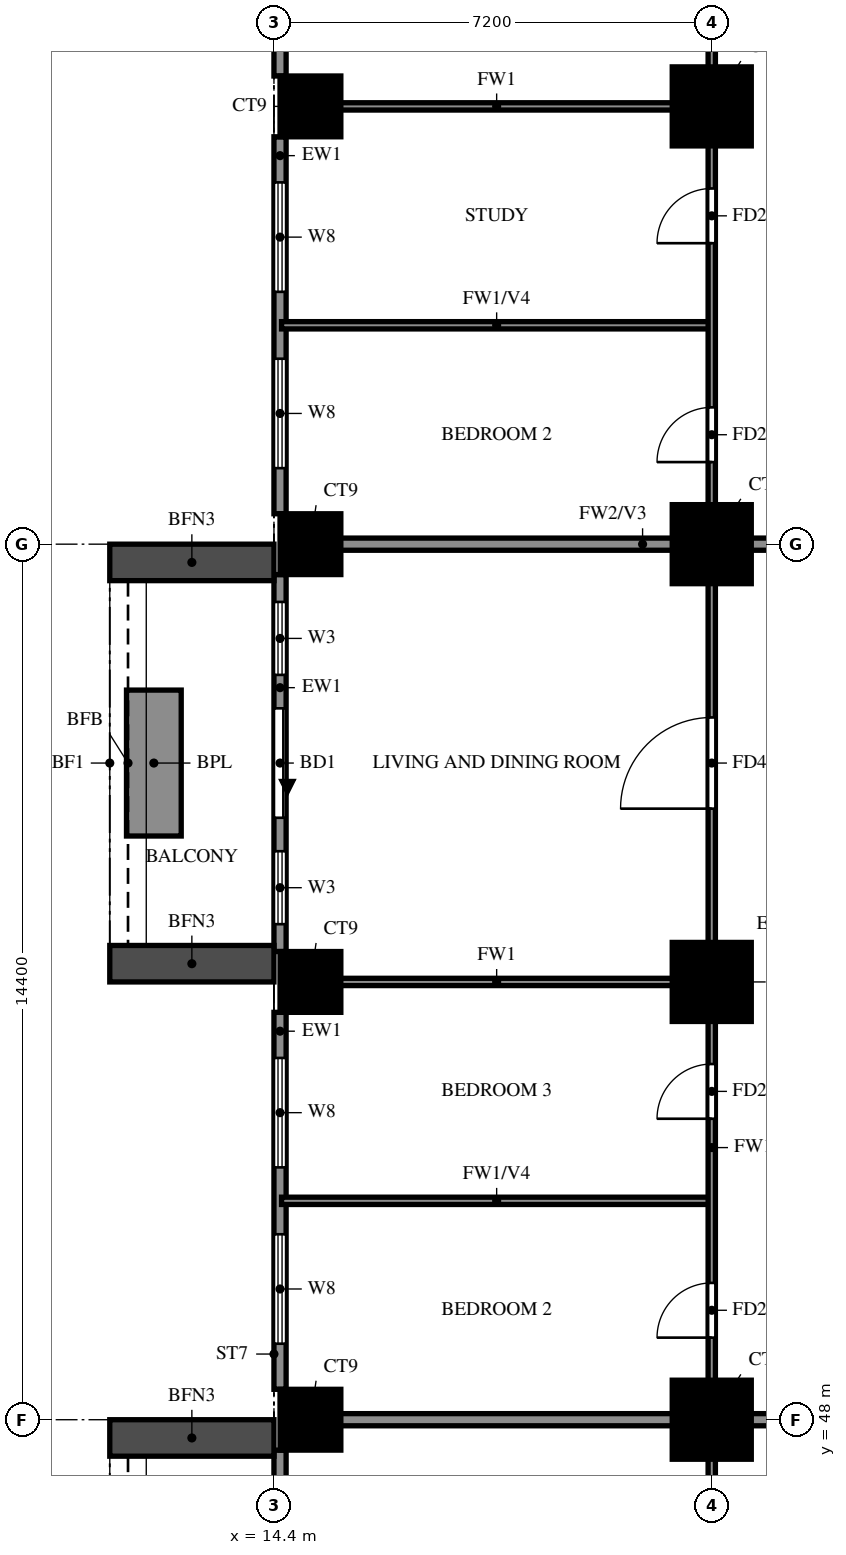
"""IFC4 building model, lengths in metres.
Left out: names, types, materials, properties, quantities, classifications, styles, units other than length and angle.
Written with IfcOpenShell. Run it as: python <this file> out.ifc"""

import sys

from ifc_helpers import new_model, si_unit, direction, frame, frame_2d, origin, origin_2d, place, context, subcontext, project, spatial, rectangle, extrude, source, transform, mapped, element, fill, save


model = new_model("IFC4")
c1 = context("Model", 3, precision=1e-05, world=origin(), true_north=direction((0.0, 1.0)))
c2 = subcontext(c1, "Body", "Model", "MODEL_VIEW")
j1 = project(units=[si_unit("LENGTHUNIT", "METRE"), si_unit("PLANEANGLEUNIT", "RADIAN")], contexts=[c1])
p1 = place(None, origin())
s1 = spatial("IfcSite", under=j1, at=p1, CompositionType="ELEMENT")
p2 = place(p1, origin())
s2 = spatial("IfcBuilding", under=s1, at=p2, CompositionType="ELEMENT")
p3 = place(p2, frame((0.0, 0.0, 69.0)))
s3 = spatial("IfcBuildingStorey", under=s2, at=p3, CompositionType="ELEMENT", Elevation=69.0)
m1 = source(origin(), c2, "Body", "SweptSolid", [
    extrude(rectangle(XDim=1.0, YDim=1.0, at=origin_2d()), origin(), (0.0, 0.0, 1.0), 3.18),
])
p4 = place(p3, frame((15.0, 48.0, 0.0), z_axis=(0.0, 0.0, 1.0), x_axis=(1.0, 0.0, 0.0)))
e1 = element("IfcColumn", 1, at=p4, inside=s3, PredefinedType="COLUMN", context=c2, shape_type="MappedRepresentation", body=[
    mapped(m1, transform((0.0, 0.0, 0.0))),
])
m2 = source(origin(), c2, "Body", "SweptSolid", [
    extrude(rectangle(XDim=1.3, YDim=1.3, at=origin_2d()), origin(), (0.0, 0.0, 1.0), 3.18),
])
p5 = place(p3, frame((21.6, 48.0, 0.0), z_axis=(0.0, 0.0, 1.0), x_axis=(1.0, 0.0, 0.0)))
e2 = element("IfcColumn", 2, at=p5, inside=s3, PredefinedType="COLUMN", context=c2, shape_type="MappedRepresentation", body=[
    mapped(m2, transform((0.0, 0.0, 0.0))),
])
p6 = place(p3, frame((15.0, 55.2, 0.0), z_axis=(0.0, 0.0, 1.0), x_axis=(1.0, 0.0, 0.0)))
e3 = element("IfcColumn", 3, at=p6, inside=s3, PredefinedType="COLUMN", context=c2, shape_type="MappedRepresentation", body=[
    mapped(m1, transform((0.0, 0.0, 0.0))),
])
p7 = place(p3, frame((21.6, 55.2, 0.0), z_axis=(0.0, 0.0, 1.0), x_axis=(1.0, 0.0, 0.0)))
e4 = element("IfcColumn", 4, at=p7, inside=s3, PredefinedType="COLUMN", context=c2, shape_type="MappedRepresentation", body=[
    mapped(m2, transform((0.0, 0.0, 0.0))),
])
p8 = place(p3, frame((15.0, 62.4, 0.0), z_axis=(0.0, 0.0, 1.0), x_axis=(1.0, 0.0, 0.0)))
e5 = element("IfcColumn", 5, at=p8, inside=s3, PredefinedType="COLUMN", context=c2, shape_type="MappedRepresentation", body=[
    mapped(m1, transform((0.0, 0.0, 0.0))),
])
p9 = place(p3, frame((21.6, 62.4, 0.0), z_axis=(0.0, 0.0, 1.0), x_axis=(1.0, 0.0, 0.0)))
e6 = element("IfcColumn", 6, at=p9, inside=s3, PredefinedType="COLUMN", context=c2, shape_type="MappedRepresentation", body=[
    mapped(m2, transform((0.0, 0.0, 0.0))),
])
p10 = place(p3, frame((15.0, 69.6, 0.0), z_axis=(0.0, 0.0, 1.0), x_axis=(1.0, 0.0, 0.0)))
e7 = element("IfcColumn", 7, at=p10, inside=s3, PredefinedType="COLUMN", context=c2, shape_type="MappedRepresentation", body=[
    mapped(m1, transform((0.0, 0.0, 0.0))),
])
p11 = place(p3, frame((21.6, 69.6, 0.0), z_axis=(0.0, 0.0, 1.0), x_axis=(1.0, 0.0, 0.0)))
e8 = element("IfcColumn", 8, at=p11, inside=s3, PredefinedType="COLUMN", context=c2, shape_type="MappedRepresentation", body=[
    mapped(m2, transform((0.0, 0.0, 0.0))),
])
p12 = place(p3, frame((14.5, 76.3, 0.0), z_axis=(0.0, 0.0, 1.0), x_axis=(0.0, -1.0, 0.0)))
e9 = element("IfcWall", 9, at=p12, inside=s3, PredefinedType="SOLIDWALL", context=c2, shape_type="SweptSolid", body=[
    extrude(rectangle(XDim=6.2, YDim=0.2, at=frame_2d((3.1, 0.0))), origin(), (0.0, 0.0, 1.0), 3.18),
])
p13 = place(p12, frame((3.65, 0.0, 0.6)))
e10 = element("IfcOpeningElement", 10, at=p13, cuts=e9, PredefinedType="OPENING", context=c2, shape_type="SweptSolid", body=[
    extrude(rectangle(XDim=1.8, YDim=2.4, at=frame_2d((0.9, 1.2))), frame((0.0, 0.11, 0.0), z_axis=(0.0, -1.0, 0.0), x_axis=(1.0, 0.0, 0.0)), (0.0, 0.0, 1.0), 0.22),
])
p14 = place(p12, frame((0.75, 0.0, 0.6)))
e11 = element("IfcOpeningElement", 11, at=p14, cuts=e9, PredefinedType="OPENING", context=c2, shape_type="SweptSolid", body=[
    extrude(rectangle(XDim=1.8, YDim=2.4, at=frame_2d((0.9, 1.2))), frame((0.0, 0.11, 0.0), z_axis=(0.0, -1.0, 0.0), x_axis=(1.0, 0.0, 0.0)), (0.0, 0.0, 1.0), 0.22),
])
p15 = place(p3, frame((14.5, 69.1, 0.0), z_axis=(0.0, 0.0, 1.0), x_axis=(0.0, -1.0, 0.0)))
e12 = element("IfcWall", 12, at=p15, inside=s3, PredefinedType="SOLIDWALL", context=c2, shape_type="SweptSolid", body=[
    extrude(rectangle(XDim=6.2, YDim=0.2, at=frame_2d((3.1, 0.0))), origin(), (0.0, 0.0, 1.0), 3.18),
])
p16 = place(p15, frame((3.65, 0.0, 0.6)))
e13 = element("IfcOpeningElement", 13, at=p16, cuts=e12, PredefinedType="OPENING", context=c2, shape_type="SweptSolid", body=[
    extrude(rectangle(XDim=1.8, YDim=2.4, at=frame_2d((0.9, 1.2))), frame((0.0, 0.11, 0.0), z_axis=(0.0, -1.0, 0.0), x_axis=(1.0, 0.0, 0.0)), (0.0, 0.0, 1.0), 0.22),
])
p17 = place(p15, frame((0.75, 0.0, 0.6)))
e14 = element("IfcOpeningElement", 14, at=p17, cuts=e12, PredefinedType="OPENING", context=c2, shape_type="SweptSolid", body=[
    extrude(rectangle(XDim=1.8, YDim=2.4, at=frame_2d((0.9, 1.2))), frame((0.0, 0.11, 0.0), z_axis=(0.0, -1.0, 0.0), x_axis=(1.0, 0.0, 0.0)), (0.0, 0.0, 1.0), 0.22),
])
p18 = place(p3, frame((14.5, 61.9, 0.0), z_axis=(0.0, 0.0, 1.0), x_axis=(0.0, -1.0, 0.0)))
e15 = element("IfcWall", 15, at=p18, inside=s3, PredefinedType="SOLIDWALL", context=c2, shape_type="SweptSolid", body=[
    extrude(rectangle(XDim=6.2, YDim=0.2, at=frame_2d((3.1, 0.0))), origin(), (0.0, 0.0, 1.0), 3.18),
])
p19 = place(p18, frame((2.2, 0.0, 0.0)))
e16 = element("IfcOpeningElement", 16, at=p19, cuts=e15, PredefinedType="OPENING", context=c2, shape_type="SweptSolid", body=[
    extrude(rectangle(XDim=1.8, YDim=2.4, at=frame_2d((0.9, 1.2))), frame((0.0, 0.11, 0.0), z_axis=(0.0, -1.0, 0.0), x_axis=(1.0, 0.0, 0.0)), (0.0, 0.0, 1.0), 0.22),
])
p20 = place(p18, frame((0.45, 0.0, 0.6)))
e17 = element("IfcOpeningElement", 17, at=p20, cuts=e15, PredefinedType="OPENING", context=c2, shape_type="SweptSolid", body=[
    extrude(rectangle(XDim=1.2, YDim=2.4, at=frame_2d((0.6, 1.2))), frame((0.0, 0.11, 0.0), z_axis=(0.0, -1.0, 0.0), x_axis=(1.0, 0.0, 0.0)), (0.0, 0.0, 1.0), 0.22),
])
p21 = place(p18, frame((4.55, 0.0, 0.6)))
e18 = element("IfcOpeningElement", 18, at=p21, cuts=e15, PredefinedType="OPENING", context=c2, shape_type="SweptSolid", body=[
    extrude(rectangle(XDim=1.2, YDim=2.4, at=frame_2d((0.6, 1.2))), frame((0.0, 0.11, 0.0), z_axis=(0.0, -1.0, 0.0), x_axis=(1.0, 0.0, 0.0)), (0.0, 0.0, 1.0), 0.22),
])
p22 = place(p3, frame((14.5, 54.7, 0.0), z_axis=(0.0, 0.0, 1.0), x_axis=(0.0, -1.0, 0.0)))
e19 = element("IfcWall", 19, at=p22, inside=s3, PredefinedType="SOLIDWALL", context=c2, shape_type="SweptSolid", body=[
    extrude(rectangle(XDim=6.2, YDim=0.2, at=frame_2d((3.1, 0.0))), origin(), (0.0, 0.0, 1.0), 3.18),
])
p23 = place(p22, frame((3.65, 0.0, 0.6)))
e20 = element("IfcOpeningElement", 20, at=p23, cuts=e19, PredefinedType="OPENING", context=c2, shape_type="SweptSolid", body=[
    extrude(rectangle(XDim=1.8, YDim=2.4, at=frame_2d((0.9, 1.2))), frame((0.0, 0.11, 0.0), z_axis=(0.0, -1.0, 0.0), x_axis=(1.0, 0.0, 0.0)), (0.0, 0.0, 1.0), 0.22),
])
p24 = place(p22, frame((0.75, 0.0, 0.6)))
e21 = element("IfcOpeningElement", 21, at=p24, cuts=e19, PredefinedType="OPENING", context=c2, shape_type="SweptSolid", body=[
    extrude(rectangle(XDim=1.8, YDim=2.4, at=frame_2d((0.9, 1.2))), frame((0.0, 0.11, 0.0), z_axis=(0.0, -1.0, 0.0), x_axis=(1.0, 0.0, 0.0)), (0.0, 0.0, 1.0), 0.22),
])
p25 = place(p3, frame((14.5, 47.5, 0.0), z_axis=(0.0, 0.0, 1.0), x_axis=(0.0, -1.0, 0.0)))
e22 = element("IfcWall", 22, at=p25, inside=s3, PredefinedType="SOLIDWALL", context=c2, shape_type="SweptSolid", body=[
    extrude(rectangle(XDim=6.2, YDim=0.2, at=frame_2d((3.1, 0.0))), origin(), (0.0, 0.0, 1.0), 3.18),
])
p26 = place(p25, frame((2.2, 0.0, 0.0)))
e23 = element("IfcOpeningElement", 23, at=p26, cuts=e22, PredefinedType="OPENING", context=c2, shape_type="SweptSolid", body=[
    extrude(rectangle(XDim=1.8, YDim=2.4, at=frame_2d((0.9, 1.2))), frame((0.0, 0.11, 0.0), z_axis=(0.0, -1.0, 0.0), x_axis=(1.0, 0.0, 0.0)), (0.0, 0.0, 1.0), 0.22),
])
p27 = place(p25, frame((0.45, 0.0, 0.6)))
e24 = element("IfcOpeningElement", 24, at=p27, cuts=e22, PredefinedType="OPENING", context=c2, shape_type="SweptSolid", body=[
    extrude(rectangle(XDim=1.2, YDim=2.4, at=frame_2d((0.6, 1.2))), frame((0.0, 0.11, 0.0), z_axis=(0.0, -1.0, 0.0), x_axis=(1.0, 0.0, 0.0)), (0.0, 0.0, 1.0), 0.22),
])
p28 = place(p25, frame((4.55, 0.0, 0.6)))
e25 = element("IfcOpeningElement", 25, at=p28, cuts=e22, PredefinedType="OPENING", context=c2, shape_type="SweptSolid", body=[
    extrude(rectangle(XDim=1.2, YDim=2.4, at=frame_2d((0.6, 1.2))), frame((0.0, 0.11, 0.0), z_axis=(0.0, -1.0, 0.0), x_axis=(1.0, 0.0, 0.0)), (0.0, 0.0, 1.0), 0.22),
])
for number, where, z_axis, x_axis in (
    (26, (14.4, 62.1, 0.0), (0.0, 0.0, 1.0), (-1.0, 0.0, 0.0)),
    (27, (14.4, 55.5, 0.0), (0.0, 0.0, 1.0), (-1.0, 0.0, 0.0)),
):
    element("IfcWall", number, at=place(p3, frame(where, z_axis=z_axis, x_axis=x_axis)), inside=s3, PredefinedType="SOLIDWALL", context=c2, shape_type="SweptSolid", body=[
        extrude(rectangle(XDim=2.7, YDim=0.6, at=frame_2d((1.35, 0.0))), origin(), (0.0, 0.0, 1.0), 2.85),
    ])
p29 = place(p3, frame((12.425, 60.0, 0.0), z_axis=(0.0, 0.0, 1.0), x_axis=(0.0, -1.0, 0.0)))
e28 = element("IfcWall", 28, at=p29, inside=s3, PredefinedType="SOLIDWALL", context=c2, shape_type="SweptSolid", body=[
    extrude(rectangle(XDim=2.4, YDim=0.9, at=frame_2d((1.2, 0.0))), origin(), (0.0, 0.0, 1.0), 0.9),
])
p30 = place(p3, frame((14.4, 47.7, 0.0), z_axis=(0.0, 0.0, 1.0), x_axis=(-1.0, 0.0, 0.0)))
e29 = element("IfcWall", 29, at=p30, inside=s3, PredefinedType="SOLIDWALL", context=c2, shape_type="SweptSolid", body=[
    extrude(rectangle(XDim=2.7, YDim=0.6, at=frame_2d((1.35, 0.0))), origin(), (0.0, 0.0, 1.0), 2.85),
])
p31 = place(p3, frame((14.525, 48.0, 0.0), z_axis=(0.0, 0.0, 1.0), x_axis=(1.0, 0.0, 0.0)))
e30 = element("IfcWall", 30, at=p31, inside=s3, PredefinedType="SOLIDWALL", context=c2, shape_type="SweptSolid", body=[
    extrude(rectangle(XDim=19.075, YDim=0.2, at=frame_2d((9.538, 0.0))), origin(), (0.0, 0.0, 1.0), 3.18),
])
p32 = place(p3, frame((14.525, 62.4, 0.0), z_axis=(0.0, 0.0, 1.0), x_axis=(1.0, 0.0, 0.0)))
e31 = element("IfcWall", 31, at=p32, inside=s3, PredefinedType="SOLIDWALL", context=c2, shape_type="SweptSolid", body=[
    extrude(rectangle(XDim=11.875, YDim=0.2, at=frame_2d((5.938, 0.0))), origin(), (0.0, 0.0, 1.0), 3.18),
])
p33 = place(p3, frame((14.525, 51.6, 0.0), z_axis=(0.0, 0.0, 1.0), x_axis=(1.0, 0.0, 0.0)))
e32 = element("IfcWall", 32, at=p33, inside=s3, PredefinedType="PARTITIONING", context=c2, shape_type="SweptSolid", body=[
    extrude(rectangle(XDim=7.075, YDim=0.12, at=frame_2d((3.538, 0.0))), origin(), (0.0, 0.0, 1.0), 2.28),
])
p34 = place(p3, frame((14.525, 55.2, 0.0), z_axis=(0.0, 0.0, 1.0), x_axis=(1.0, 0.0, 0.0)))
e33 = element("IfcWall", 33, at=p34, inside=s3, PredefinedType="PARTITIONING", context=c2, shape_type="SweptSolid", body=[
    extrude(rectangle(XDim=7.075, YDim=0.12, at=frame_2d((3.538, 0.0))), origin(), (0.0, 0.0, 1.0), 3.18),
])
p35 = place(p3, frame((14.525, 66.0, 0.0), z_axis=(0.0, 0.0, 1.0), x_axis=(1.0, 0.0, 0.0)))
e34 = element("IfcWall", 34, at=p35, inside=s3, PredefinedType="PARTITIONING", context=c2, shape_type="SweptSolid", body=[
    extrude(rectangle(XDim=7.075, YDim=0.12, at=frame_2d((3.538, 0.0))), origin(), (0.0, 0.0, 1.0), 2.28),
])
p36 = place(p3, frame((14.525, 69.6, 0.0), z_axis=(0.0, 0.0, 1.0), x_axis=(1.0, 0.0, 0.0)))
e35 = element("IfcWall", 35, at=p36, inside=s3, PredefinedType="PARTITIONING", context=c2, shape_type="SweptSolid", body=[
    extrude(rectangle(XDim=7.075, YDim=0.12, at=frame_2d((3.538, 0.0))), origin(), (0.0, 0.0, 1.0), 3.18),
])
p37 = place(p3, frame((21.6, 33.725, 0.0), z_axis=(0.0, 0.0, 1.0), x_axis=(0.0, 1.0, 0.0)))
e36 = element("IfcWall", 36, at=p37, inside=s3, PredefinedType="PARTITIONING", context=c2, shape_type="SweptSolid", body=[
    extrude(rectangle(XDim=39.475, YDim=0.12, at=frame_2d((19.737, 0.0))), origin(), (0.0, 0.0, 1.0), 3.18),
])
p38 = place(p37, frame((7.775, 0.0, 0.0)))
e37 = element("IfcOpeningElement", 37, at=p38, cuts=e36, PredefinedType="OPENING", context=c2, shape_type="SweptSolid", body=[
    extrude(rectangle(XDim=0.9, YDim=2.1, at=frame_2d((0.45, 1.05))), frame((0.0, 0.07, 0.0), z_axis=(0.0, -1.0, 0.0), x_axis=(1.0, 0.0, 0.0)), (0.0, 0.0, 1.0), 0.14),
])
p39 = place(p37, frame((15.625, 0.0, 0.0)))
e38 = element("IfcOpeningElement", 38, at=p39, cuts=e36, PredefinedType="OPENING", context=c2, shape_type="SweptSolid", body=[
    extrude(rectangle(XDim=0.9, YDim=2.1, at=frame_2d((0.45, 1.05))), frame((0.0, 0.07, 0.0), z_axis=(0.0, -1.0, 0.0), x_axis=(1.0, 0.0, 0.0)), (0.0, 0.0, 1.0), 0.14),
])
p40 = place(p37, frame((19.225, 0.0, 0.0)))
e39 = element("IfcOpeningElement", 39, at=p40, cuts=e36, PredefinedType="OPENING", context=c2, shape_type="SweptSolid", body=[
    extrude(rectangle(XDim=0.9, YDim=2.1, at=frame_2d((0.45, 1.05))), frame((0.0, 0.07, 0.0), z_axis=(0.0, -1.0, 0.0), x_axis=(1.0, 0.0, 0.0)), (0.0, 0.0, 1.0), 0.14),
])
p41 = place(p37, frame((24.325, 0.0, 0.0)))
e40 = element("IfcOpeningElement", 40, at=p41, cuts=e36, PredefinedType="OPENING", context=c2, shape_type="SweptSolid", body=[
    extrude(rectangle(XDim=1.5, YDim=2.1, at=frame_2d((0.75, 1.05))), frame((0.0, 0.07, 0.0), z_axis=(0.0, -1.0, 0.0), x_axis=(1.0, 0.0, 0.0)), (0.0, 0.0, 1.0), 0.14),
])
p42 = place(p37, frame((30.025, 0.0, 0.0)))
e41 = element("IfcOpeningElement", 41, at=p42, cuts=e36, PredefinedType="OPENING", context=c2, shape_type="SweptSolid", body=[
    extrude(rectangle(XDim=0.9, YDim=2.1, at=frame_2d((0.45, 1.05))), frame((0.0, 0.07, 0.0), z_axis=(0.0, -1.0, 0.0), x_axis=(1.0, 0.0, 0.0)), (0.0, 0.0, 1.0), 0.14),
])
p43 = place(p37, frame((33.625, 0.0, 0.0)))
e42 = element("IfcOpeningElement", 42, at=p43, cuts=e36, PredefinedType="OPENING", context=c2, shape_type="SweptSolid", body=[
    extrude(rectangle(XDim=0.9, YDim=2.1, at=frame_2d((0.45, 1.05))), frame((0.0, 0.07, 0.0), z_axis=(0.0, -1.0, 0.0), x_axis=(1.0, 0.0, 0.0)), (0.0, 0.0, 1.0), 0.14),
])
p44 = place(p37, frame((37.225, 0.0, 0.0)))
e43 = element("IfcOpeningElement", 43, at=p44, cuts=e36, PredefinedType="OPENING", context=c2, shape_type="SweptSolid", body=[
    extrude(rectangle(XDim=0.9, YDim=2.1, at=frame_2d((0.45, 1.05))), frame((0.0, 0.07, 0.0), z_axis=(0.0, -1.0, 0.0), x_axis=(1.0, 0.0, 0.0)), (0.0, 0.0, 1.0), 0.14),
])
p45 = place(p16, origin())
e44 = element("IfcWindow", 44, at=p45, inside=s3, PartitioningType="DOUBLE_PANEL_VERTICAL", PredefinedType="WINDOW", context=c2, shape_type="SweptSolid", body=[
    extrude(rectangle(XDim=1.8, YDim=2.4, at=frame_2d((0.9, 1.2))), frame((0.0, 0.03, 0.0), z_axis=(0.0, -1.0, 0.0), x_axis=(1.0, 0.0, 0.0)), (0.0, 0.0, 1.0), 0.06),
])
fill(e13, e44)
p46 = place(p17, origin())
e45 = element("IfcWindow", 45, at=p46, inside=s3, PartitioningType="DOUBLE_PANEL_VERTICAL", PredefinedType="WINDOW", context=c2, shape_type="SweptSolid", body=[
    extrude(rectangle(XDim=1.8, YDim=2.4, at=frame_2d((0.9, 1.2))), frame((0.0, 0.03, 0.0), z_axis=(0.0, -1.0, 0.0), x_axis=(1.0, 0.0, 0.0)), (0.0, 0.0, 1.0), 0.06),
])
fill(e14, e45)
p47 = place(p19, origin())
e46 = element("IfcDoor", 46, at=p47, inside=s3, OperationType="DOUBLE_DOOR_SLIDING", PredefinedType="DOOR", context=c2, shape_type="SweptSolid", body=[
    extrude(rectangle(XDim=1.8, YDim=2.4, at=frame_2d((0.9, 1.2))), frame((0.0, 0.025, 0.0), z_axis=(0.0, -1.0, 0.0), x_axis=(1.0, 0.0, 0.0)), (0.0, 0.0, 1.0), 0.05),
])
fill(e16, e46)
p48 = place(p20, origin())
e47 = element("IfcWindow", 47, at=p48, inside=s3, PartitioningType="SINGLE_PANEL", PredefinedType="WINDOW", context=c2, shape_type="SweptSolid", body=[
    extrude(rectangle(XDim=1.2, YDim=2.4, at=frame_2d((0.6, 1.2))), frame((0.0, 0.03, 0.0), z_axis=(0.0, -1.0, 0.0), x_axis=(1.0, 0.0, 0.0)), (0.0, 0.0, 1.0), 0.06),
])
fill(e17, e47)
p49 = place(p21, origin())
e48 = element("IfcWindow", 48, at=p49, inside=s3, PartitioningType="SINGLE_PANEL", PredefinedType="WINDOW", context=c2, shape_type="SweptSolid", body=[
    extrude(rectangle(XDim=1.2, YDim=2.4, at=frame_2d((0.6, 1.2))), frame((0.0, 0.03, 0.0), z_axis=(0.0, -1.0, 0.0), x_axis=(1.0, 0.0, 0.0)), (0.0, 0.0, 1.0), 0.06),
])
fill(e18, e48)
p50 = place(p23, origin())
e49 = element("IfcWindow", 49, at=p50, inside=s3, PartitioningType="DOUBLE_PANEL_VERTICAL", PredefinedType="WINDOW", context=c2, shape_type="SweptSolid", body=[
    extrude(rectangle(XDim=1.8, YDim=2.4, at=frame_2d((0.9, 1.2))), frame((0.0, 0.03, 0.0), z_axis=(0.0, -1.0, 0.0), x_axis=(1.0, 0.0, 0.0)), (0.0, 0.0, 1.0), 0.06),
])
fill(e20, e49)
p51 = place(p24, origin())
e50 = element("IfcWindow", 50, at=p51, inside=s3, PartitioningType="DOUBLE_PANEL_VERTICAL", PredefinedType="WINDOW", context=c2, shape_type="SweptSolid", body=[
    extrude(rectangle(XDim=1.8, YDim=2.4, at=frame_2d((0.9, 1.2))), frame((0.0, 0.03, 0.0), z_axis=(0.0, -1.0, 0.0), x_axis=(1.0, 0.0, 0.0)), (0.0, 0.0, 1.0), 0.06),
])
fill(e21, e50)
p52 = place(p39, origin())
e51 = element("IfcDoor", 51, at=p52, inside=s3, OperationType="SINGLE_SWING_LEFT", PredefinedType="DOOR", context=c2, shape_type="SweptSolid", body=[
    extrude(rectangle(XDim=0.9, YDim=2.1, at=frame_2d((0.45, 1.05))), frame((0.0, 0.025, 0.0), z_axis=(0.0, -1.0, 0.0), x_axis=(1.0, 0.0, 0.0)), (0.0, 0.0, 1.0), 0.05),
])
fill(e38, e51)
p53 = place(p40, origin())
e52 = element("IfcDoor", 52, at=p53, inside=s3, OperationType="SINGLE_SWING_RIGHT", PredefinedType="DOOR", context=c2, shape_type="SweptSolid", body=[
    extrude(rectangle(XDim=0.9, YDim=2.1, at=frame_2d((0.45, 1.05))), frame((0.0, 0.025, 0.0), z_axis=(0.0, -1.0, 0.0), x_axis=(1.0, 0.0, 0.0)), (0.0, 0.0, 1.0), 0.05),
])
fill(e39, e52)
p54 = place(p41, origin())
e53 = element("IfcDoor", 53, at=p54, inside=s3, OperationType="SINGLE_SWING_LEFT", PredefinedType="DOOR", context=c2, shape_type="SweptSolid", body=[
    extrude(rectangle(XDim=1.5, YDim=2.1, at=frame_2d((0.75, 1.05))), frame((0.0, 0.025, 0.0), z_axis=(0.0, -1.0, 0.0), x_axis=(1.0, 0.0, 0.0)), (0.0, 0.0, 1.0), 0.05),
])
fill(e40, e53)
p55 = place(p42, origin())
e54 = element("IfcDoor", 54, at=p55, inside=s3, OperationType="SINGLE_SWING_LEFT", PredefinedType="DOOR", context=c2, shape_type="SweptSolid", body=[
    extrude(rectangle(XDim=0.9, YDim=2.1, at=frame_2d((0.45, 1.05))), frame((0.0, 0.025, 0.0), z_axis=(0.0, -1.0, 0.0), x_axis=(1.0, 0.0, 0.0)), (0.0, 0.0, 1.0), 0.05),
])
fill(e41, e54)
p56 = place(p43, origin())
e55 = element("IfcDoor", 55, at=p56, inside=s3, OperationType="SINGLE_SWING_RIGHT", PredefinedType="DOOR", context=c2, shape_type="SweptSolid", body=[
    extrude(rectangle(XDim=0.9, YDim=2.1, at=frame_2d((0.45, 1.05))), frame((0.0, 0.025, 0.0), z_axis=(0.0, -1.0, 0.0), x_axis=(1.0, 0.0, 0.0)), (0.0, 0.0, 1.0), 0.05),
])
fill(e42, e55)
save(model, sys.argv[1])
